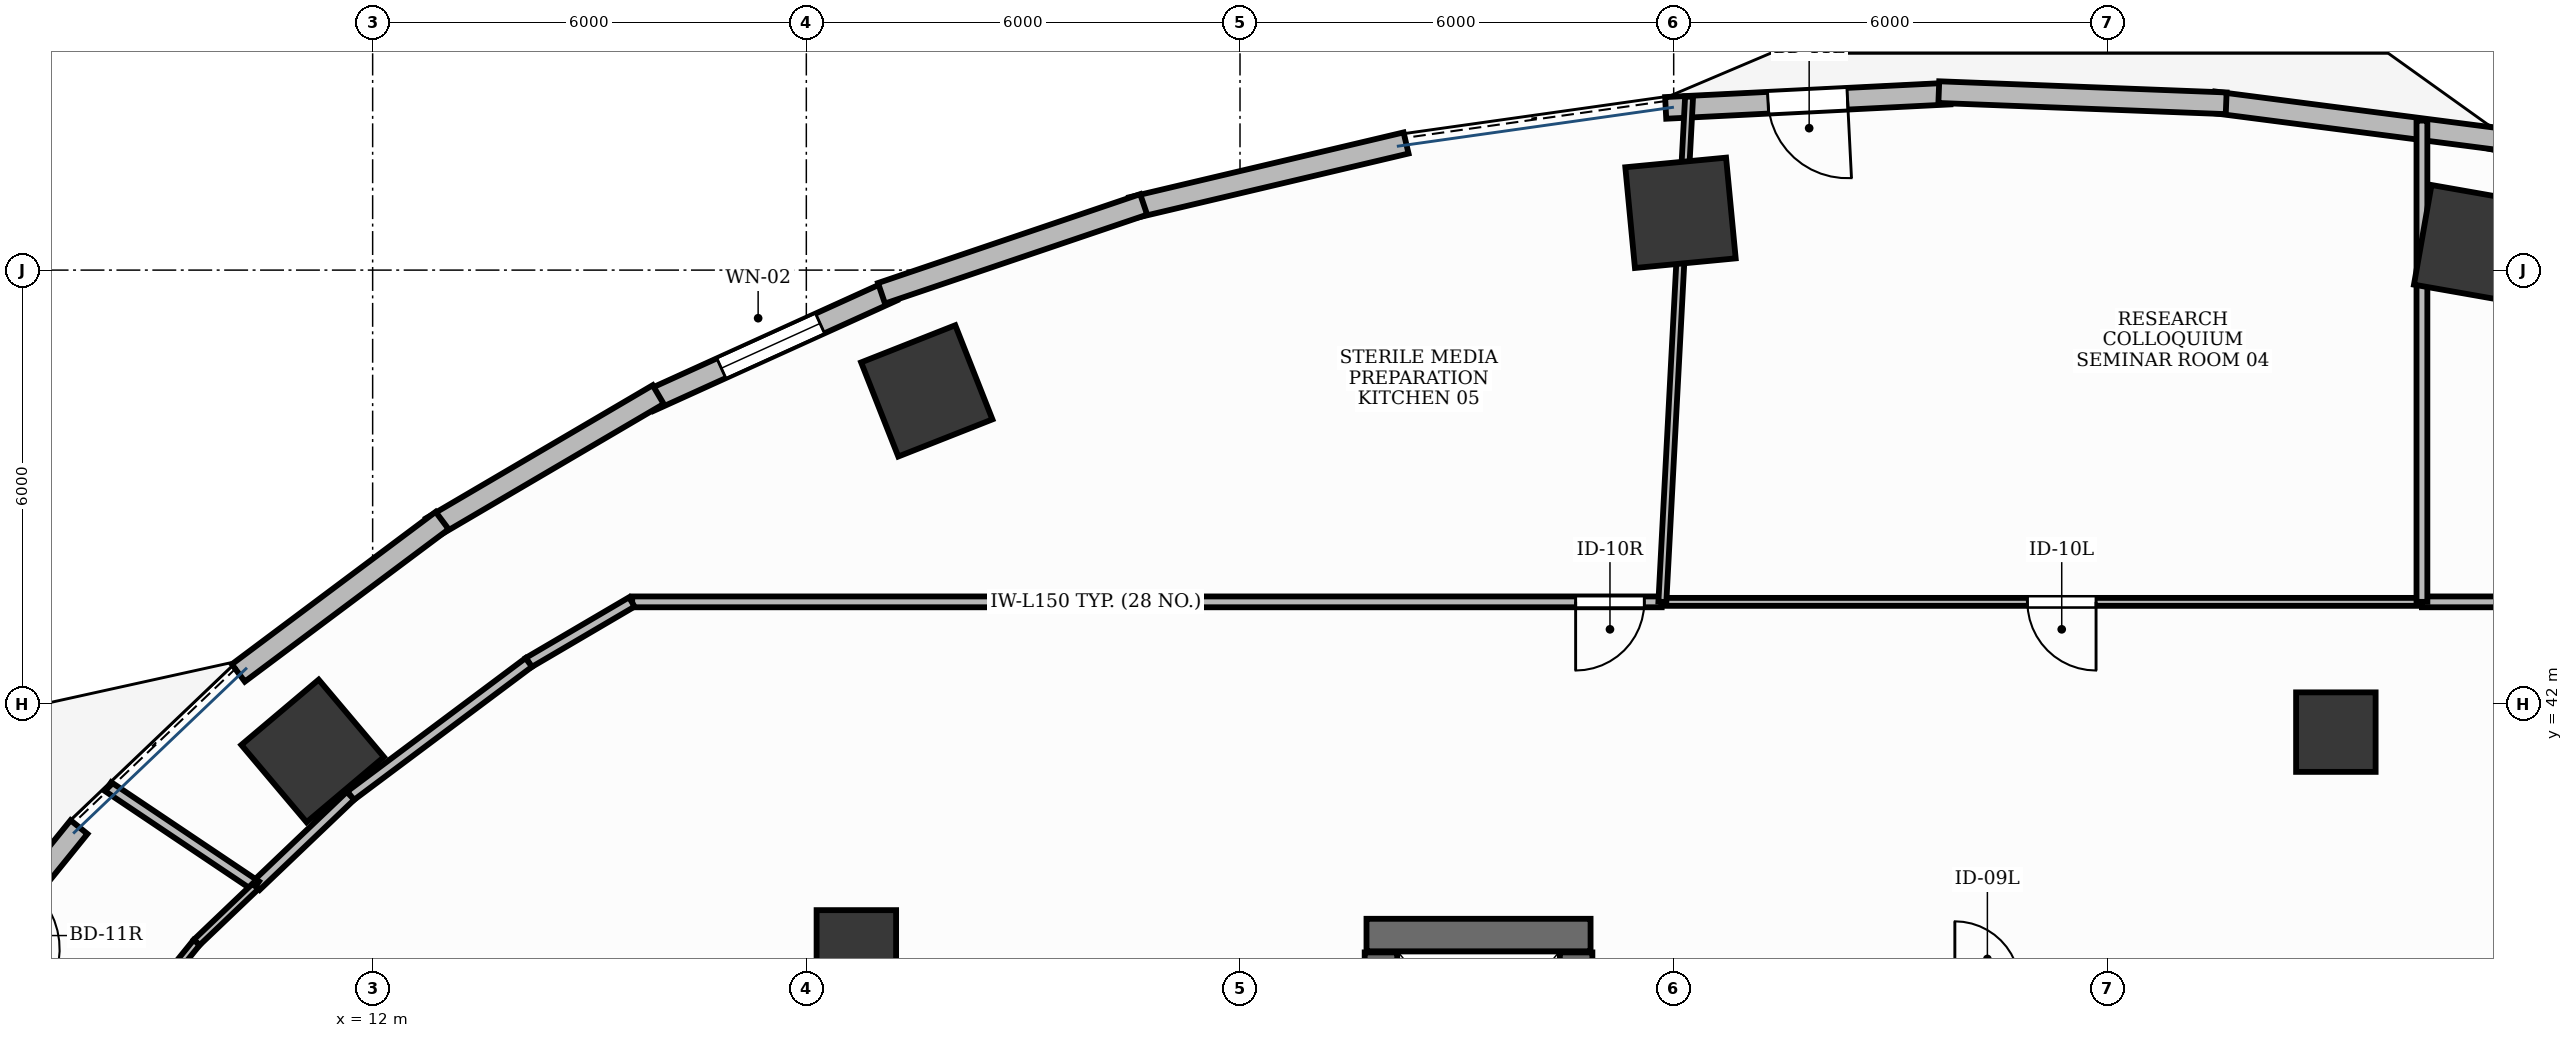
"""IFC4 building model, lengths in metres.
Left out: names, types, materials, properties, quantities, classifications, styles, units other than length and angle.
Written with IfcOpenShell. Run it as: python <this file> out.ifc"""

import sys

from ifc_helpers import new_model, si_unit, direction, frame, frame_2d, origin, origin_2d, place, context, subcontext, project, spatial, rectangle, extrude, element, fill, save


model = new_model("IFC4")
c1 = context("Model", 3, precision=1e-05, world=origin(), true_north=direction((0.0, 1.0)))
c2 = subcontext(c1, "Body", "Model", "MODEL_VIEW")
j1 = project(units=[si_unit("LENGTHUNIT", "METRE"), si_unit("PLANEANGLEUNIT", "RADIAN")], contexts=[c1])
p1 = place(None, origin())
s1 = spatial("IfcSite", under=j1, at=p1, CompositionType="ELEMENT")
p2 = place(p1, origin())
s2 = spatial("IfcBuilding", under=s1, at=p2, CompositionType="ELEMENT")
p3 = place(p2, frame((0.0, 0.0, 63.6)))
s3 = spatial("IfcBuildingStorey", under=s2, at=p3, CompositionType="ELEMENT", Elevation=63.6)
p4 = place(p3, frame((25.75, 38.8, 0.0), z_axis=(0.0, 0.0, 1.0), x_axis=(1.0, 0.0, 0.0)))
e1 = element("IfcWall", 1, at=p4, inside=s3, PredefinedType="SHEAR", context=c2, shape_type="SweptSolid", body=[
    extrude(rectangle(XDim=3.1, YDim=0.45, at=frame_2d((1.55, 0.0))), origin(), (0.0, 0.0, 1.0), 3.9),
])
for number, where, z_axis, x_axis in (
    (2, (25.95, 35.86, 0.0), (0.0, 0.0, 1.0), (0.0, 1.0, 0.0)),
    (3, (28.65, 35.86, 0.0), (0.0, 0.0, 1.0), (0.0, 1.0, 0.0)),
):
    element("IfcWall", number, at=place(p3, frame(where, z_axis=z_axis, x_axis=x_axis)), inside=s3, PredefinedType="SHEAR", context=c2, shape_type="SweptSolid", body=[
        extrude(rectangle(XDim=2.7, YDim=0.45, at=frame_2d((1.35, 0.0))), origin(), (0.0, 0.0, 1.0), 3.9),
    ])
p5 = place(p3, frame((41.052, 48.367, -0.0), z_axis=(0.0, 0.0, 1.0), x_axis=(-0.984868307662, 0.173304404339, 0.0)))
e4 = element("IfcColumn", 4, at=p5, inside=s3, PredefinedType="COLUMN", context=c2, shape_type="SweptSolid", body=[
    extrude(rectangle(XDim=1.4, YDim=1.4, at=origin_2d()), origin(), (0.0, 0.0, 1.0), 3.901),
])
p6 = place(p3, frame((39.161, 41.608, -0.0), z_axis=(0.0, 0.0, 1.0), x_axis=(1.0, 0.0, 0.0)))
e5 = element("IfcColumn", 5, at=p6, inside=s3, PredefinedType="COLUMN", context=c2, shape_type="SweptSolid", body=[
    extrude(rectangle(XDim=1.1, YDim=1.1, at=origin_2d()), origin(), (0.0, 0.0, 1.0), 3.901),
])
for number, where, z_axis, x_axis in (
    (6, (30.094, 48.792, -0.0), (0.0, 0.0, 1.0), (0.995, 0.095, 0.0)),
    (7, (19.667, 46.329, -0.0), (0.0, 0.0, 1.0), (0.93, 0.367, 0.0)),
    (8, (11.17, 41.347, -0.0), (0.0, 0.0, 1.0), (0.764, 0.645, 0.0)),
):
    element("IfcColumn", number, at=place(p3, frame(where, z_axis=z_axis, x_axis=x_axis)), inside=s3, PredefinedType="COLUMN", context=c2, shape_type="SweptSolid", body=[
        extrude(rectangle(XDim=1.4, YDim=1.4, at=origin_2d()), origin(), (0.0, 0.0, 1.0), 3.901),
    ])
p7 = place(p3, frame((18.692, 38.595, -0.0), z_axis=(0.0, 0.0, 1.0), x_axis=(1.0, 0.0, 0.0)))
e9 = element("IfcColumn", 9, at=p7, inside=s3, PredefinedType="COLUMN", context=c2, shape_type="SweptSolid", body=[
    extrude(rectangle(XDim=1.1, YDim=1.1, at=origin_2d()), origin(), (0.0, 0.0, 1.0), 3.901),
])
p8 = place(p3, frame((33.821, 50.442, 0.0), z_axis=(0.0, 0.0, 1.0), x_axis=(-0.99873153138, -0.050352042933, 0.0)))
e10 = element("IfcWall", 10, at=p8, inside=s3, PredefinedType="STANDARD", context=c2, shape_type="SweptSolid", body=[
    extrude(rectangle(XDim=3.937, YDim=0.3, at=frame_2d((1.969, 0.0))), origin(), (0.0, 0.0, 1.0), 3.9),
])
p9 = place(p8, frame((1.419, 0.0, 0.0)))
e11 = element("IfcOpeningElement", 11, at=p9, cuts=e10, PredefinedType="OPENING", context=c2, shape_type="SweptSolid", body=[
    extrude(rectangle(XDim=1.1, YDim=2.15, at=frame_2d((0.55, 1.075))), frame((0.0, 0.165, 0.0), z_axis=(0.0, -1.0, 0.0), x_axis=(1.0, 0.0, 0.0)), (0.0, 0.0, 1.0), 0.33),
])
p10 = place(p3, frame((19.191, 47.717, 0.0), z_axis=(0.0, 0.0, 1.0), x_axis=(-0.910608120407, -0.413270917254, 0.0)))
e12 = element("IfcWall", 12, at=p10, inside=s3, PredefinedType="STANDARD", context=c2, shape_type="SweptSolid", body=[
    extrude(rectangle(XDim=3.7, YDim=0.3, at=frame_2d((1.85, 0.0))), origin(), (0.0, 0.0, 1.0), 3.9),
])
p11 = place(p10, frame((1.1, 0.0, 0.95)))
e13 = element("IfcOpeningElement", 13, at=p11, cuts=e12, PredefinedType="OPENING", context=c2, shape_type="SweptSolid", body=[
    extrude(rectangle(XDim=1.5, YDim=1.8, at=frame_2d((0.75, 0.9))), frame((0.0, 0.165, 0.0), z_axis=(0.0, -1.0, 0.0), x_axis=(1.0, 0.0, 0.0)), (0.0, 0.0, 1.0), 0.33),
])
p12 = place(p3, frame((7.938, 40.294, 0.0), z_axis=(0.0, 0.0, 1.0), x_axis=(-0.629295540187, -0.777166084631, 0.0)))
e14 = element("IfcWall", 14, at=p12, inside=s3, PredefinedType="STANDARD", context=c2, shape_type="SweptSolid", body=[
    extrude(rectangle(XDim=3.248, YDim=0.3, at=frame_2d((1.624, 0.0))), origin(), (0.0, 0.0, 1.0), 3.9),
])
p13 = place(p12, frame((1.074, 0.0, 0.0)))
e15 = element("IfcOpeningElement", 15, at=p13, cuts=e14, PredefinedType="OPENING", context=c2, shape_type="SweptSolid", body=[
    extrude(rectangle(XDim=1.1, YDim=2.15, at=frame_2d((0.55, 1.075))), frame((0.0, 0.165, 0.0), z_axis=(0.0, -1.0, 0.0), x_axis=(1.0, 0.0, 0.0)), (0.0, 0.0, 1.0), 0.33),
])
p14 = place(p3, frame((45.04, 48.991, 0.0), z_axis=(0.0, 0.0, 1.0), x_axis=(-0.975868573345, 0.218358713032, 0.0)))
e16 = element("IfcWall", 16, at=p14, inside=s3, PredefinedType="STANDARD", context=c2, shape_type="SweptSolid", body=[
    extrude(rectangle(XDim=3.909, YDim=0.3, at=frame_2d((1.954, 0.0))), origin(), (0.0, 0.0, 1.0), 3.9),
])
p15 = place(p3, frame((41.395, 49.815, 0.0), z_axis=(0.0, 0.0, 1.0), x_axis=(-0.991734095036, 0.128310111617, 0.0)))
e17 = element("IfcWall", 17, at=p15, inside=s3, PredefinedType="STANDARD", context=c2, shape_type="SweptSolid", body=[
    extrude(rectangle(XDim=3.956, YDim=0.3, at=frame_2d((1.978, 0.0))), origin(), (0.0, 0.0, 1.0), 3.9),
])
p16 = place(p3, frame((37.644, 50.308, 0.0), z_axis=(0.0, 0.0, 1.0), x_axis=(-0.999245411623, 0.038840794937, 0.0)))
e18 = element("IfcWall", 18, at=p16, inside=s3, PredefinedType="STANDARD", context=c2, shape_type="SweptSolid", body=[
    extrude(rectangle(XDim=3.979, YDim=0.3, at=frame_2d((1.989, 0.0))), origin(), (0.0, 0.0, 1.0), 3.9),
])
p17 = place(p3, frame((26.297, 49.759, 0.0), z_axis=(0.0, 0.0, 1.0), x_axis=(-0.973197600754, -0.229970497863, 0.0)))
e19 = element("IfcWall", 19, at=p17, inside=s3, PredefinedType="STANDARD", context=c2, shape_type="SweptSolid", body=[
    extrude(rectangle(XDim=3.901, YDim=0.3, at=frame_2d((1.951, 0.0))), origin(), (0.0, 0.0, 1.0), 3.9),
])
p18 = place(p3, frame((22.667, 48.909, 0.0), z_axis=(0.0, 0.0, 1.0), x_axis=(-0.94702579403, -0.321157508773, 0.0)))
e20 = element("IfcWall", 20, at=p18, inside=s3, PredefinedType="STANDARD", context=c2, shape_type="SweptSolid", body=[
    extrude(rectangle(XDim=3.83, YDim=0.3, at=frame_2d((1.915, 0.0))), origin(), (0.0, 0.0, 1.0), 3.47),
])
p19 = place(p3, frame((15.951, 46.278, 0.0), z_axis=(0.0, 0.0, 1.0), x_axis=(-0.8624654944, -0.506115867139, 0.0)))
e21 = element("IfcWall", 21, at=p19, inside=s3, PredefinedType="STANDARD", context=c2, shape_type="SweptSolid", body=[
    extrude(rectangle(XDim=3.635, YDim=0.3, at=frame_2d((1.818, 0.0))), origin(), (0.0, 0.0, 1.0), 3.9),
])
p20 = place(p3, frame((12.961, 44.535, 0.0), z_axis=(0.0, 0.0, 1.0), x_axis=(-0.800823020995, -0.598901067827, 0.0)))
e22 = element("IfcWall", 22, at=p20, inside=s3, PredefinedType="STANDARD", context=c2, shape_type="SweptSolid", body=[
    extrude(rectangle(XDim=3.521, YDim=0.3, at=frame_2d((1.76, 0.0))), origin(), (0.0, 0.0, 1.0), 3.9),
])
p21 = place(p3, frame((40.342, 43.41, 0.0), z_axis=(0.0, 0.0, 1.0), x_axis=(-1.0, 0.0, 0.0)))
e23 = element("IfcWall", 23, at=p21, inside=s3, PredefinedType="MOVABLE", context=c2, shape_type="SweptSolid", body=[
    extrude(rectangle(XDim=10.499, YDim=0.11, at=frame_2d((5.249, 0.0))), origin(), (0.0, 0.0, 1.0), 2.91),
])
p22 = place(p21, frame((4.499, 0.0, 0.0)))
e24 = element("IfcOpeningElement", 24, at=p22, cuts=e23, PredefinedType="OPENING", context=c2, shape_type="SweptSolid", body=[
    extrude(rectangle(XDim=0.95, YDim=2.15, at=frame_2d((0.475, 1.075))), frame((0.0, 0.07, 0.0), z_axis=(0.0, -1.0, 0.0), x_axis=(1.0, 0.0, 0.0)), (0.0, 0.0, 1.0), 0.14),
])
p23 = place(p3, frame((29.833, 43.41, 0.0), z_axis=(0.0, 0.0, 1.0), x_axis=(-1.0, 0.0, 0.0)))
e25 = element("IfcWall", 25, at=p23, inside=s3, PredefinedType="PARTITIONING", context=c2, shape_type="SweptSolid", body=[
    extrude(rectangle(XDim=14.243, YDim=0.15, at=frame_2d((7.121, 0.0))), origin(), (0.0, 0.0, 1.0), 2.91),
])
p24 = place(p23, frame((0.24, 0.0, 0.0)))
e26 = element("IfcOpeningElement", 26, at=p24, cuts=e25, PredefinedType="OPENING", context=c2, shape_type="SweptSolid", body=[
    extrude(rectangle(XDim=0.95, YDim=2.15, at=frame_2d((0.475, 1.075))), frame((0.0, 0.09, 0.0), z_axis=(0.0, -1.0, 0.0), x_axis=(1.0, 0.0, 0.0)), (0.0, 0.0, 1.0), 0.18),
])
p25 = place(p3, frame((44.2, 43.41, 0.0), z_axis=(0.0, 0.0, 1.0), x_axis=(-1.0, 0.0, 0.0)))
e27 = element("IfcWall", 27, at=p25, inside=s3, PredefinedType="PARTITIONING", context=c2, shape_type="SweptSolid", body=[
    extrude(rectangle(XDim=3.848, YDim=0.15, at=frame_2d((1.924, 0.0))), origin(), (0.0, 0.0, 1.0), 2.91),
])
p26 = place(p3, frame((40.352, 43.41, 0.0), z_axis=(0.0, 0.0, 1.0), x_axis=(0.0, 1.0, 0.0)))
e28 = element("IfcWall", 28, at=p26, inside=s3, PredefinedType="PARTITIONING", context=c2, shape_type="SweptSolid", body=[
    extrude(rectangle(XDim=6.659, YDim=0.15, at=frame_2d((3.329, 0.0))), origin(), (0.0, 0.0, 1.0), 2.91),
])
p27 = place(p3, frame((29.844, 43.41, 0.0), z_axis=(0.0, 0.0, 1.0), x_axis=(0.052809646161, 0.998604597061, 0.0)))
e29 = element("IfcWall", 29, at=p27, inside=s3, PredefinedType="MOVABLE", context=c2, shape_type="SweptSolid", body=[
    extrude(rectangle(XDim=6.999, YDim=0.11, at=frame_2d((3.5, 0.0))), origin(), (0.0, 0.0, 1.0), 2.91),
])
p28 = place(p3, frame((15.586, 43.409, 0.0), z_axis=(0.0, 0.0, 1.0), x_axis=(-0.862446636904, -0.506148000582, 0.0)))
e30 = element("IfcWall", 30, at=p28, inside=s3, PredefinedType="PARTITIONING", context=c2, shape_type="SweptSolid", body=[
    extrude(rectangle(XDim=1.652, YDim=0.15, at=frame_2d((0.826, 0.0))), origin(), (0.0, 0.0, 1.0), 2.91),
])
p29 = place(p3, frame((14.16, 42.572, 0.0), z_axis=(0.0, 0.0, 1.0), x_axis=(-0.800808090092, -0.598921032227, 0.0)))
e31 = element("IfcWall", 31, at=p29, inside=s3, PredefinedType="PARTITIONING", context=c2, shape_type="SweptSolid", body=[
    extrude(rectangle(XDim=3.079, YDim=0.15, at=frame_2d((1.54, 0.0))), origin(), (0.0, 0.0, 1.0), 2.91),
])
p30 = place(p3, frame((11.693, 40.727, 0.0), z_axis=(0.0, 0.0, 1.0), x_axis=(-0.723662214514, -0.690154330048, 0.0)))
e32 = element("IfcWall", 32, at=p30, inside=s3, PredefinedType="PARTITIONING", context=c2, shape_type="SweptSolid", body=[
    extrude(rectangle(XDim=1.807, YDim=0.15, at=frame_2d((0.903, 0.0))), origin(), (0.0, 0.0, 1.0), 2.91),
])
p31 = place(p3, frame((10.386, 39.48, 0.0), z_axis=(0.0, 0.0, 1.0), x_axis=(-0.830276202789, 0.557352157152, 0.0)))
e33 = element("IfcWall", 33, at=p31, inside=s3, PredefinedType="PARTITIONING", context=c2, shape_type="SweptSolid", body=[
    extrude(rectangle(XDim=2.462, YDim=0.15, at=frame_2d((1.231, 0.0))), origin(), (0.0, 0.0, 1.0), 2.91),
])
p32 = place(p3, frame((10.378, 39.473, 0.0), z_axis=(0.0, 0.0, 1.0), x_axis=(-0.723760277906, -0.690051490924, 0.0)))
e34 = element("IfcWall", 34, at=p32, inside=s3, PredefinedType="MOVABLE", context=c2, shape_type="SweptSolid", body=[
    extrude(rectangle(XDim=1.123, YDim=0.11, at=frame_2d((0.561, 0.0))), origin(), (0.0, 0.0, 1.0), 2.91),
])
p33 = place(p3, frame((9.565, 38.697, 0.0), z_axis=(0.0, 0.0, 1.0), x_axis=(-0.629270515505, -0.777186347227, 0.0)))
e35 = element("IfcWall", 35, at=p33, inside=s3, PredefinedType="MOVABLE", context=c2, shape_type="SweptSolid", body=[
    extrude(rectangle(XDim=2.817, YDim=0.11, at=frame_2d((1.409, 0.0))), origin(), (0.0, 0.0, 1.0), 2.91),
])
p34 = place(p9, origin())
e36 = element("IfcDoor", 36, at=p34, inside=s3, OperationType="SINGLE_SWING_LEFT", PredefinedType="DOOR", context=c2, shape_type="SweptSolid", body=[
    extrude(rectangle(XDim=1.1, YDim=2.15, at=frame_2d((0.55, 1.075))), frame((0.0, 0.025, 0.0), z_axis=(0.0, -1.0, 0.0), x_axis=(1.0, 0.0, 0.0)), (0.0, 0.0, 1.0), 0.05),
])
fill(e11, e36)
p35 = place(p11, origin())
e37 = element("IfcWindow", 37, at=p35, inside=s3, PartitioningType="DOUBLE_PANEL_VERTICAL", PredefinedType="WINDOW", context=c2, shape_type="SweptSolid", body=[
    extrude(rectangle(XDim=1.5, YDim=1.8, at=frame_2d((0.75, 0.9))), frame((0.0, 0.03, 0.0), z_axis=(0.0, -1.0, 0.0), x_axis=(1.0, 0.0, 0.0)), (0.0, 0.0, 1.0), 0.06),
])
fill(e13, e37)
p36 = place(p22, origin())
e38 = element("IfcDoor", 38, at=p36, inside=s3, OperationType="SINGLE_SWING_LEFT", PredefinedType="DOOR", context=c2, shape_type="SweptSolid", body=[
    extrude(rectangle(XDim=0.95, YDim=2.15, at=frame_2d((0.475, 1.075))), frame((0.0, 0.025, 0.0), z_axis=(0.0, -1.0, 0.0), x_axis=(1.0, 0.0, 0.0)), (0.0, 0.0, 1.0), 0.05),
])
fill(e24, e38)
p37 = place(p24, origin())
e39 = element("IfcDoor", 39, at=p37, inside=s3, OperationType="SINGLE_SWING_RIGHT", PredefinedType="DOOR", context=c2, shape_type="SweptSolid", body=[
    extrude(rectangle(XDim=0.95, YDim=2.15, at=frame_2d((0.475, 1.075))), frame((0.0, 0.025, 0.0), z_axis=(0.0, -1.0, 0.0), x_axis=(1.0, 0.0, 0.0)), (0.0, 0.0, 1.0), 0.05),
])
fill(e26, e39)
save(model, sys.argv[1])
